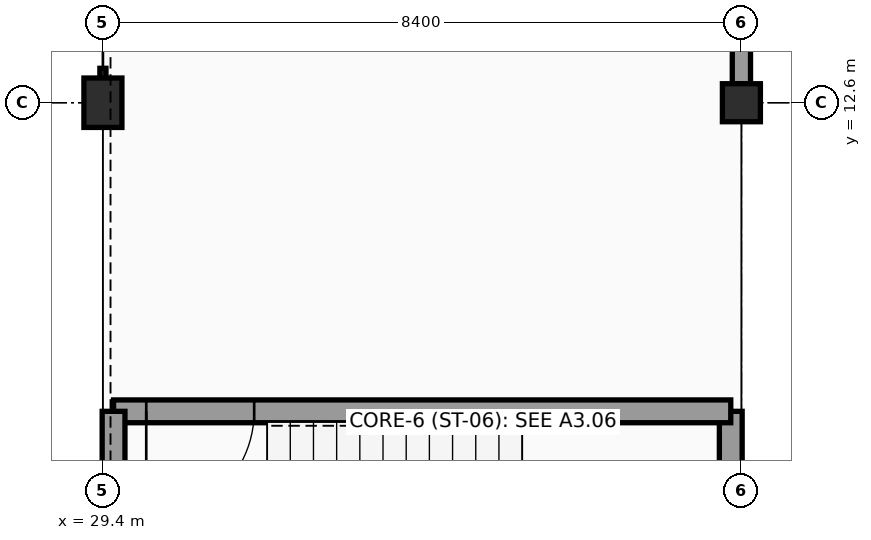
"""IFC4 building model, lengths in metres.
Left out: names, types, materials, properties, quantities, classifications, styles, units other than length and angle.
Written with IfcOpenShell. Run it as: python <this file> out.ifc"""

import sys

from ifc_helpers import new_model, si_unit, direction, frame, frame_2d, origin, origin_2d, place, context, subcontext, project, spatial, rectangle, extrude, element, fill, save


model = new_model("IFC4")
c1 = context("Model", 3, precision=1e-05, world=origin(), true_north=direction((0.0, 1.0)))
c2 = subcontext(c1, "Body", "Model", "MODEL_VIEW")
j1 = project(units=[si_unit("LENGTHUNIT", "METRE"), si_unit("PLANEANGLEUNIT", "RADIAN")], contexts=[c1])
p1 = place(None, origin())
s1 = spatial("IfcSite", under=j1, at=p1, CompositionType="ELEMENT")
p2 = place(p1, origin())
s2 = spatial("IfcBuilding", under=s1, at=p2, CompositionType="ELEMENT")
p3 = place(p2, frame((0.0, 0.0, 4.2)))
s3 = spatial("IfcBuildingStorey", under=s2, at=p3, CompositionType="ELEMENT", Elevation=4.2)
p4 = place(p3, frame((29.4, 12.6, 0.0), z_axis=(0.0, 0.0, 1.0), x_axis=(1.0, 0.0, 0.0)))
e1 = element("IfcColumn", 1, at=p4, inside=s3, PredefinedType="COLUMN", context=c2, shape_type="SweptSolid", body=[
    extrude(rectangle(XDim=0.5, YDim=0.65, at=origin_2d()), origin(), (0.0, 0.0, 1.0), 3.6),
])
p5 = place(p3, frame((37.8, 12.6, 0.0), z_axis=(0.0, 0.0, 1.0), x_axis=(1.0, 0.0, 0.0)))
e2 = element("IfcColumn", 2, at=p5, inside=s3, PredefinedType="COLUMN", context=c2, shape_type="SweptSolid", body=[
    extrude(rectangle(XDim=0.5, YDim=0.5, at=origin_2d()), origin(), (0.0, 0.0, 1.0), 3.6),
])
p6 = place(p3, frame((37.8, 20.752, 0.0), z_axis=(0.0, 0.0, 1.0), x_axis=(0.0, -1.0, 0.0)))
e3 = element("IfcWall", 3, at=p6, inside=s3, PredefinedType="SOLIDWALL", context=c2, shape_type="SweptSolid", body=[
    extrude(rectangle(XDim=7.904, YDim=0.24, at=frame_2d((3.952, 0.0))), origin(), (0.0, 0.0, 1.0), 2.58),
])
p7 = place(p3, frame((37.66, 4.34, 0.0), z_axis=(0.0, 0.0, 1.0), x_axis=(0.0, 1.0, 0.0)))
e4 = element("IfcWall", 4, at=p7, inside=s3, PredefinedType="SHEAR", context=c2, shape_type="SweptSolid", body=[
    extrude(rectangle(XDim=4.2, YDim=0.3, at=frame_2d((2.1, 0.0))), origin(), (0.0, 0.0, 1.0), 3.6),
])
p8 = place(p3, frame((37.66, 8.54, 0.0), z_axis=(0.0, 0.0, 1.0), x_axis=(-1.0, 0.0, 0.0)))
e5 = element("IfcWall", 5, at=p8, inside=s3, PredefinedType="SHEAR", context=c2, shape_type="SweptSolid", body=[
    extrude(rectangle(XDim=8.12, YDim=0.3, at=frame_2d((4.06, 0.0))), origin(), (0.0, 0.0, 1.0), 3.6),
])
p9 = place(p8, frame((6.27, 0.0, 0.0)))
e6 = element("IfcOpeningElement", 6, at=p9, cuts=e5, PredefinedType="OPENING", context=c2, shape_type="SweptSolid", body=[
    extrude(rectangle(XDim=1.42, YDim=2.15, at=frame_2d((0.71, 1.075))), frame((0.0, 0.16, 0.0), z_axis=(0.0, -1.0, 0.0), x_axis=(1.0, 0.0, 0.0)), (0.0, 0.0, 1.0), 0.32),
])
p10 = place(p3, frame((29.54, 8.54, 0.0), z_axis=(0.0, 0.0, 1.0), x_axis=(0.0, -1.0, 0.0)))
e7 = element("IfcWall", 7, at=p10, inside=s3, PredefinedType="SHEAR", context=c2, shape_type="SweptSolid", body=[
    extrude(rectangle(XDim=4.2, YDim=0.3, at=frame_2d((2.1, 0.0))), origin(), (0.0, 0.0, 1.0), 3.6),
])
p11 = place(p9, frame((1.42, 0.0, 0.0), z_axis=(0.0, 0.0, 1.0), x_axis=(-1.0, 0.0, 0.0)))
e8 = element("IfcDoor", 8, at=p11, inside=s3, OperationType="SINGLE_SWING_RIGHT", PredefinedType="DOOR", context=c2, shape_type="SweptSolid", body=[
    extrude(rectangle(XDim=1.42, YDim=2.15, at=frame_2d((0.71, 1.075))), frame((0.0, 0.025, 0.0), z_axis=(0.0, -1.0, 0.0), x_axis=(1.0, 0.0, 0.0)), (0.0, 0.0, 1.0), 0.05),
])
fill(e6, e8)
save(model, sys.argv[1])
